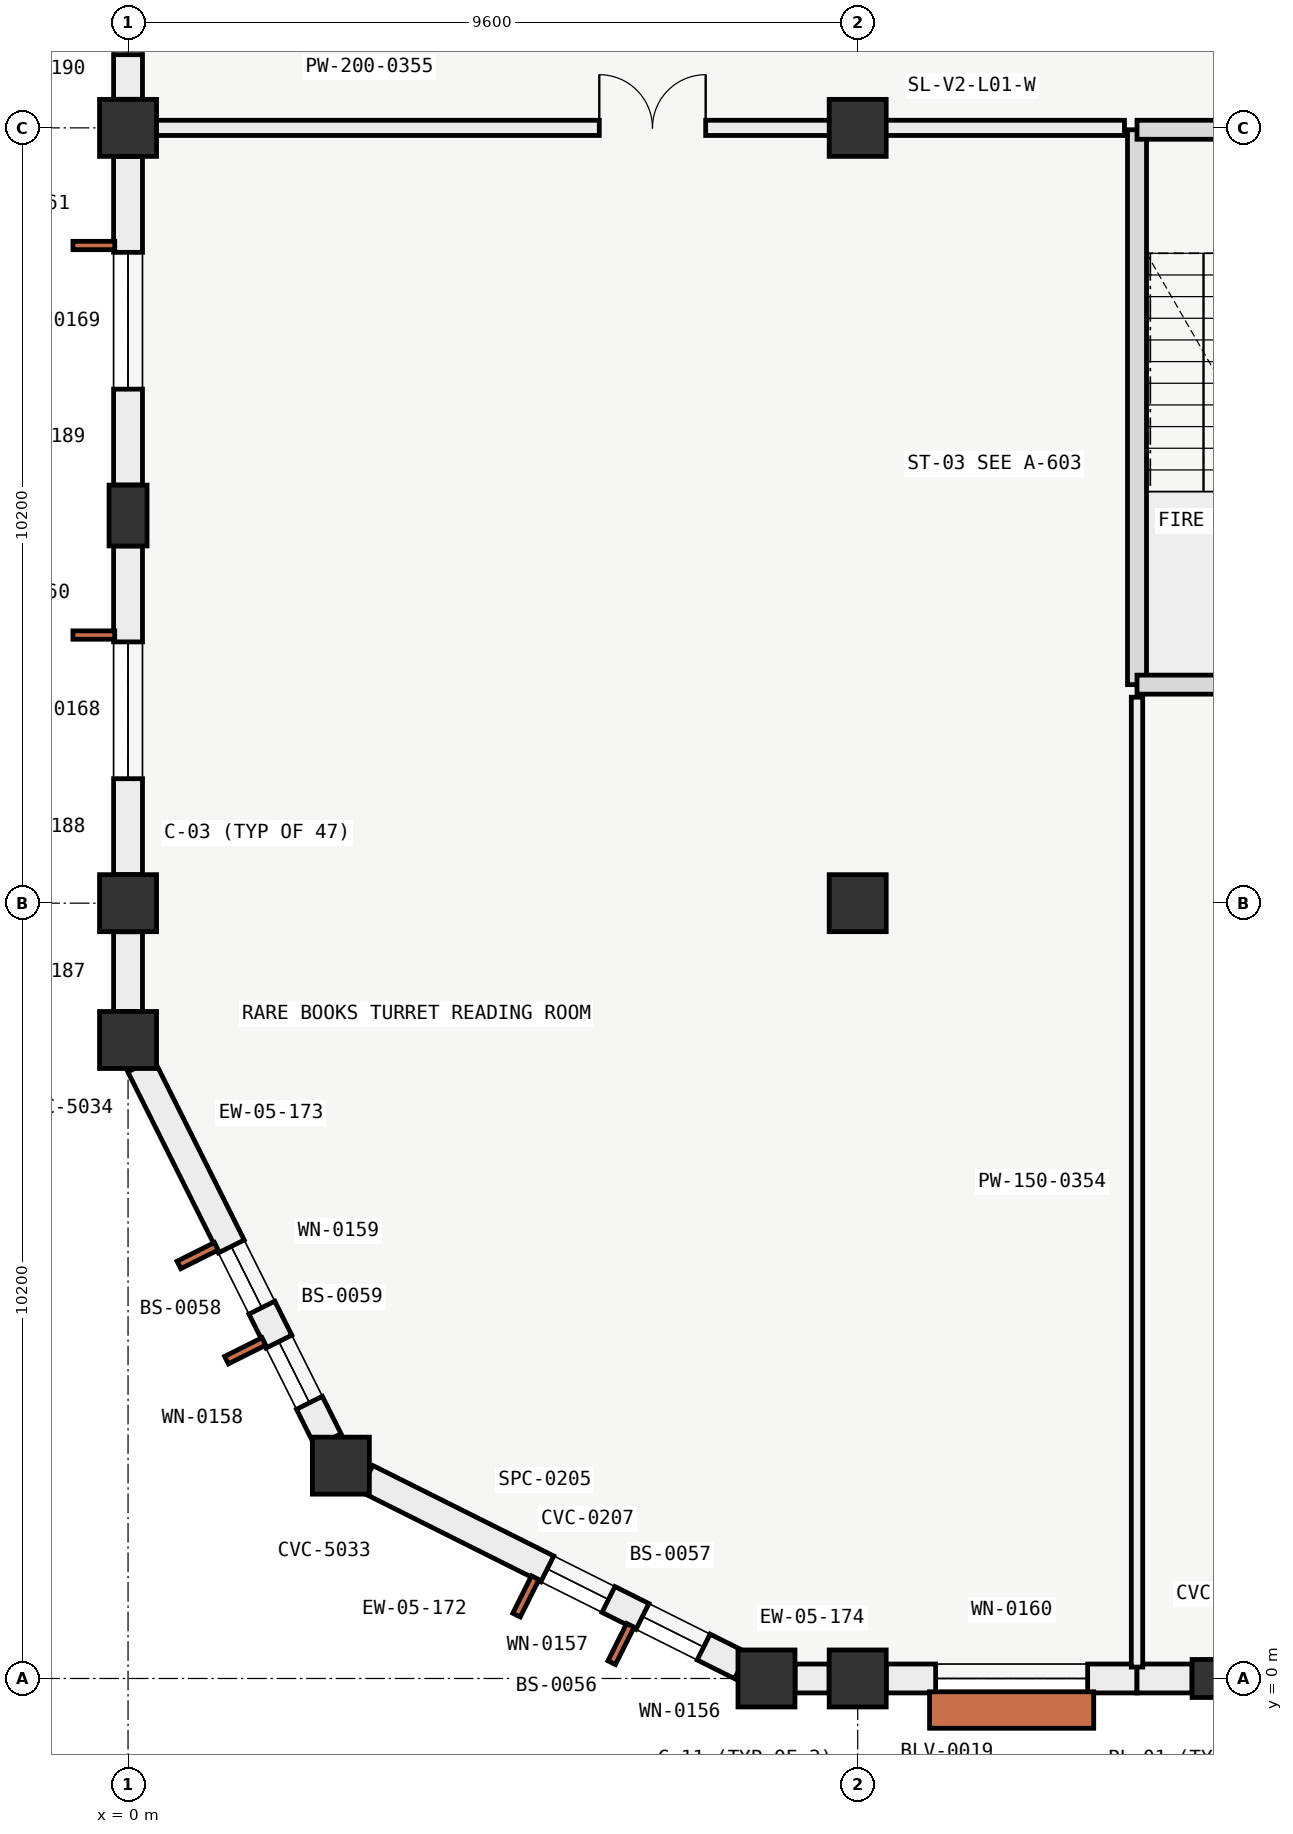
"""IFC4 building model, lengths in metres.
Left out: names, types, materials, properties, quantities, classifications, styles, units other than length and angle.
Written with IfcOpenShell. Run it as: python <this file> out.ifc"""

import sys

from ifc_helpers import new_model, si_unit, direction, frame, frame_2d, origin, origin_2d, place, context, subcontext, project, spatial, rectangle, circle, extrude, element, fill, save


model = new_model("IFC4")
c1 = context("Model", 3, precision=1e-05, world=origin(), true_north=direction((0.0, 1.0)))
c2 = subcontext(c1, "Body", "Model", "MODEL_VIEW")
j1 = project(units=[si_unit("LENGTHUNIT", "METRE"), si_unit("PLANEANGLEUNIT", "RADIAN")], contexts=[c1])
p1 = place(None, origin())
s1 = spatial("IfcSite", under=j1, at=p1, CompositionType="ELEMENT")
p2 = place(p1, origin())
s2 = spatial("IfcBuilding", under=s1, at=p2, CompositionType="ELEMENT")
p3 = place(p2, frame((0.0, 0.0, 5.4)))
s3 = spatial("IfcBuildingStorey", under=s2, at=p3, CompositionType="ELEMENT", Elevation=5.4)
for number, where, z_axis, x_axis in (
    (1, (0.0, 10.2, 0.0), (0.0, 0.0, 1.0), (1.0, 0.0, 0.0)),
    (2, (0.0, 20.4, 0.0), (0.0, 0.0, 1.0), (1.0, 0.0, 0.0)),
    (3, (9.6, 0.0, 0.0), (0.0, 0.0, 1.0), (1.0, 0.0, 0.0)),
    (4, (9.6, 10.2, 0.0), (0.0, 0.0, 1.0), (1.0, 0.0, 0.0)),
    (5, (9.6, 20.4, 0.0), (0.0, 0.0, 1.0), (1.0, 0.0, 0.0)),
):
    element("IfcColumn", number, at=place(p3, frame(where, z_axis=z_axis, x_axis=x_axis)), inside=s3, PredefinedType="COLUMN", context=c2, shape_type="SweptSolid", body=[
        extrude(rectangle(XDim=0.75, YDim=0.75, at=origin_2d()), origin(), (0.0, 0.0, 1.0), 4.2),
    ])
for number, where, z_axis, x_axis in (
    (6, (8.4, 0.0, 0.0), (0.0, 0.0, 1.0), (0.0, 1.0, 0.0)),
    (7, (2.8, 2.8, 0.0), (0.0, 0.0, 1.0), (0.707, 0.707, 0.0)),
    (8, (0.0, 8.4, 0.0), (0.0, 0.0, 1.0), (1.0, 0.0, 0.0)),
):
    element("IfcColumn", number, at=place(p3, frame(where, z_axis=z_axis, x_axis=x_axis)), inside=s3, PredefinedType="COLUMN", context=c2, shape_type="SweptSolid", body=[
        extrude(circle(Radius=0.375, at=origin_2d()), origin(), (0.0, 0.0, 1.0), 4.2),
    ])
for number, where, z_axis, x_axis in (
    (9, (14.4, 0.0, 0.0), (0.0, 0.0, 1.0), (0.0, 1.0, 0.0)),
    (10, (0.0, 15.3, 0.0), (0.0, 0.0, 1.0), (1.0, 0.0, 0.0)),
):
    element("IfcColumn", number, at=place(p3, frame(where, z_axis=z_axis, x_axis=x_axis)), inside=s3, PredefinedType="PILASTER", context=c2, shape_type="SweptSolid", body=[
        extrude(rectangle(XDim=0.5, YDim=0.8, at=origin_2d()), origin(), (0.0, 0.0, 1.0), 4.2),
    ])
p4 = place(p3, frame((8.065, 0.167, 0.0), z_axis=(0.0, 0.0, 1.0), x_axis=(-0.89443604882, 0.447195879422, 0.0)))
e11 = element("IfcWall", 11, at=p4, inside=s3, PredefinedType="SOLIDWALL", context=c2, shape_type="SweptSolid", body=[
    extrude(rectangle(XDim=5.512, YDim=0.38, at=frame_2d((2.756, 0.0))), origin(), (0.0, 0.0, 1.0), 3.2),
])
p5 = place(p4, frame((0.55, 0.0, 0.7)))
e12 = element("IfcOpeningElement", 12, at=p5, cuts=e11, PredefinedType="OPENING", context=c2, shape_type="SweptSolid", body=[
    extrude(rectangle(XDim=0.9, YDim=2.2, at=frame_2d((0.45, 1.1))), frame((0.0, 0.2, 0.0), z_axis=(0.0, -1.0, 0.0), x_axis=(1.0, 0.0, 0.0)), (0.0, 0.0, 1.0), 0.4),
])
p6 = place(p4, frame((1.95, 0.0, 0.7)))
e13 = element("IfcOpeningElement", 13, at=p6, cuts=e11, PredefinedType="OPENING", context=c2, shape_type="SweptSolid", body=[
    extrude(rectangle(XDim=0.9, YDim=2.2, at=frame_2d((0.45, 1.1))), frame((0.0, 0.2, 0.0), z_axis=(0.0, -1.0, 0.0), x_axis=(1.0, 0.0, 0.0)), (0.0, 0.0, 1.0), 0.4),
])
p7 = place(p3, frame((2.633, 3.135, 0.0), z_axis=(0.0, 0.0, 1.0), x_axis=(-0.447195879422, 0.89443604882, 0.0)))
e14 = element("IfcWall", 14, at=p7, inside=s3, PredefinedType="SOLIDWALL", context=c2, shape_type="SweptSolid", body=[
    extrude(rectangle(XDim=5.512, YDim=0.38, at=frame_2d((2.756, 0.0))), origin(), (0.0, 0.0, 1.0), 3.2),
])
p8 = place(p7, frame((0.55, 0.0, 0.7)))
e15 = element("IfcOpeningElement", 15, at=p8, cuts=e14, PredefinedType="OPENING", context=c2, shape_type="SweptSolid", body=[
    extrude(rectangle(XDim=0.9, YDim=2.2, at=frame_2d((0.45, 1.1))), frame((0.0, 0.2, 0.0), z_axis=(0.0, -1.0, 0.0), x_axis=(1.0, 0.0, 0.0)), (0.0, 0.0, 1.0), 0.4),
])
p9 = place(p7, frame((1.95, 0.0, 0.7)))
e16 = element("IfcOpeningElement", 16, at=p9, cuts=e14, PredefinedType="OPENING", context=c2, shape_type="SweptSolid", body=[
    extrude(rectangle(XDim=0.9, YDim=2.2, at=frame_2d((0.45, 1.1))), frame((0.0, 0.2, 0.0), z_axis=(0.0, -1.0, 0.0), x_axis=(1.0, 0.0, 0.0)), (0.0, 0.0, 1.0), 0.4),
])
p10 = place(p3, frame((9.224, 0.0, 0.0), z_axis=(0.0, 0.0, 1.0), x_axis=(-1.0, 0.0, 0.0)))
e17 = element("IfcWall", 17, at=p10, inside=s3, PredefinedType="SOLIDWALL", context=c2, shape_type="SweptSolid", body=[
    extrude(rectangle(XDim=0.448, YDim=0.38, at=frame_2d((0.224, 0.0))), origin(), (0.0, 0.0, 1.0), 3.25),
])
p11 = place(p3, frame((13.275, 0.0, 0.0), z_axis=(0.0, 0.0, 1.0), x_axis=(-1.0, 0.0, 0.0)))
e18 = element("IfcWall", 18, at=p11, inside=s3, PredefinedType="SOLIDWALL", context=c2, shape_type="SweptSolid", body=[
    extrude(rectangle(XDim=3.299, YDim=0.38, at=frame_2d((1.649, 0.0))), origin(), (0.0, 0.0, 1.0), 3.25),
])
p12 = place(p11, frame((0.649, 0.0, 0.8)))
e19 = element("IfcOpeningElement", 19, at=p12, cuts=e18, PredefinedType="OPENING", context=c2, shape_type="SweptSolid", body=[
    extrude(rectangle(XDim=2.0, YDim=1.35, at=frame_2d((1.0, 0.675))), frame((0.0, 0.2, 0.0), z_axis=(0.0, -1.0, 0.0), x_axis=(1.0, 0.0, 0.0)), (0.0, 0.0, 1.0), 0.4),
])
p13 = place(p3, frame((13.999, 0.0, 0.0), z_axis=(0.0, 0.0, 1.0), x_axis=(-1.0, 0.0, 0.0)))
e20 = element("IfcWall", 20, at=p13, inside=s3, PredefinedType="SOLIDWALL", context=c2, shape_type="SweptSolid", body=[
    extrude(rectangle(XDim=0.724, YDim=0.38, at=frame_2d((0.362, 0.0))), origin(), (0.0, 0.0, 1.0), 3.25),
])
p14 = place(p3, frame((0.0, 8.776, 0.0), z_axis=(0.0, 0.0, 1.0), x_axis=(0.0, 1.0, 0.0)))
e21 = element("IfcWall", 21, at=p14, inside=s3, PredefinedType="SOLIDWALL", context=c2, shape_type="SweptSolid", body=[
    extrude(rectangle(XDim=1.048, YDim=0.38, at=frame_2d((0.524, 0.0))), origin(), (0.0, 0.0, 1.0), 3.25),
])
p15 = place(p3, frame((0.0, 10.576, 0.0), z_axis=(0.0, 0.0, 1.0), x_axis=(0.0, 1.0, 0.0)))
e22 = element("IfcWall", 22, at=p15, inside=s3, PredefinedType="SOLIDWALL", context=c2, shape_type="SweptSolid", body=[
    extrude(rectangle(XDim=4.323, YDim=0.38, at=frame_2d((2.162, 0.0))), origin(), (0.0, 0.0, 1.0), 3.25),
])
p16 = place(p15, frame((1.261, 0.0, 0.85)))
e23 = element("IfcOpeningElement", 23, at=p16, cuts=e22, PredefinedType="OPENING", context=c2, shape_type="SweptSolid", body=[
    extrude(rectangle(XDim=1.8, YDim=2.1, at=frame_2d((0.9, 1.05))), frame((0.0, 0.2, 0.0), z_axis=(0.0, -1.0, 0.0), x_axis=(1.0, 0.0, 0.0)), (0.0, 0.0, 1.0), 0.4),
])
p17 = place(p3, frame((0.0, 15.701, 0.0), z_axis=(0.0, 0.0, 1.0), x_axis=(0.0, 1.0, 0.0)))
e24 = element("IfcWall", 24, at=p17, inside=s3, PredefinedType="SOLIDWALL", context=c2, shape_type="SweptSolid", body=[
    extrude(rectangle(XDim=4.323, YDim=0.38, at=frame_2d((2.162, 0.0))), origin(), (0.0, 0.0, 1.0), 3.25),
])
p18 = place(p17, frame((1.261, 0.0, 0.85)))
e25 = element("IfcOpeningElement", 25, at=p18, cuts=e24, PredefinedType="OPENING", context=c2, shape_type="SweptSolid", body=[
    extrude(rectangle(XDim=1.8, YDim=2.1, at=frame_2d((0.9, 1.05))), frame((0.0, 0.2, 0.0), z_axis=(0.0, -1.0, 0.0), x_axis=(1.0, 0.0, 0.0)), (0.0, 0.0, 1.0), 0.4),
])
p19 = place(p3, frame((0.0, 20.776, 0.0), z_axis=(0.0, 0.0, 1.0), x_axis=(0.0, 1.0, 0.0)))
e26 = element("IfcWall", 26, at=p19, inside=s3, PredefinedType="SOLIDWALL", context=c2, shape_type="SweptSolid", body=[
    extrude(rectangle(XDim=3.174, YDim=0.38, at=frame_2d((1.587, 0.0))), origin(), (0.0, 0.0, 1.0), 3.25),
])
p20 = place(p19, frame((0.587, 0.0, 0.75)))
e27 = element("IfcOpeningElement", 27, at=p20, cuts=e26, PredefinedType="OPENING", context=c2, shape_type="SweptSolid", body=[
    extrude(rectangle(XDim=2.0, YDim=1.35, at=frame_2d((1.0, 0.675))), frame((0.0, 0.2, 0.0), z_axis=(0.0, -1.0, 0.0), x_axis=(1.0, 0.0, 0.0)), (0.0, 0.0, 1.0), 0.4),
])
p21 = place(p3, frame((13.275, 20.375, 0.0), z_axis=(0.0, 0.0, 1.0), x_axis=(0.0, -1.0, 0.0)))
e28 = element("IfcWall", 28, at=p21, inside=s3, PredefinedType="SOLIDWALL", context=c2, shape_type="SweptSolid", body=[
    extrude(rectangle(XDim=7.3, YDim=0.25, at=frame_2d((3.65, 0.0))), origin(), (0.0, 0.0, 1.0), 3.92),
])
p22 = place(p3, frame((13.275, 13.075, 0.0), z_axis=(0.0, 0.0, 1.0), x_axis=(1.0, 0.0, 0.0)))
e29 = element("IfcWall", 29, at=p22, inside=s3, PredefinedType="SOLIDWALL", context=c2, shape_type="SweptSolid", body=[
    extrude(rectangle(XDim=3.45, YDim=0.25, at=frame_2d((1.725, 0.0))), origin(), (0.0, 0.0, 1.0), 3.92),
])
p23 = place(p3, frame((16.725, 20.375, 0.0), z_axis=(0.0, 0.0, 1.0), x_axis=(-1.0, 0.0, 0.0)))
e30 = element("IfcWall", 30, at=p23, inside=s3, PredefinedType="SOLIDWALL", context=c2, shape_type="SweptSolid", body=[
    extrude(rectangle(XDim=3.45, YDim=0.25, at=frame_2d((1.725, 0.0))), origin(), (0.0, 0.0, 1.0), 3.92),
])
p24 = place(p23, frame((1.175, 0.0, 0.0)))
e31 = element("IfcOpeningElement", 31, at=p24, cuts=e30, PredefinedType="OPENING", context=c2, shape_type="SweptSolid", body=[
    extrude(rectangle(XDim=1.1, YDim=2.2, at=frame_2d((0.55, 1.1))), frame((0.0, 0.135, 0.0), z_axis=(0.0, -1.0, 0.0), x_axis=(1.0, 0.0, 0.0)), (0.0, 0.0, 1.0), 0.27),
])
p25 = place(p3, frame((13.275, 0.15, 0.0), z_axis=(0.0, 0.0, 1.0), x_axis=(0.0, 1.0, 0.0)))
e32 = element("IfcWall", 32, at=p25, inside=s3, PredefinedType="PARTITIONING", context=c2, shape_type="SweptSolid", body=[
    extrude(rectangle(XDim=12.76, YDim=0.15, at=frame_2d((6.38, 0.0))), origin(), (0.0, 0.0, 1.0), 3.2),
])
p26 = place(p3, frame((0.15, 20.4, 0.0), z_axis=(0.0, 0.0, 1.0), x_axis=(1.0, 0.0, 0.0)))
e33 = element("IfcWall", 33, at=p26, inside=s3, PredefinedType="PARTITIONING", context=c2, shape_type="SweptSolid", body=[
    extrude(rectangle(XDim=12.96, YDim=0.2, at=frame_2d((6.48, 0.0))), origin(), (0.0, 0.0, 1.0), 3.2),
])
p27 = place(p26, frame((6.05, 0.0, 0.0)))
e34 = element("IfcOpeningElement", 34, at=p27, cuts=e33, PredefinedType="OPENING", context=c2, shape_type="SweptSolid", body=[
    extrude(rectangle(XDim=1.4, YDim=2.2, at=frame_2d((0.7, 1.1))), frame((0.0, 0.11, 0.0), z_axis=(0.0, -1.0, 0.0), x_axis=(1.0, 0.0, 0.0)), (0.0, 0.0, 1.0), 0.22),
])
p28 = place(p5, origin())
e35 = element("IfcWindow", 35, at=p28, inside=s3, PartitioningType="SINGLE_PANEL", PredefinedType="WINDOW", context=c2, shape_type="SweptSolid", body=[
    extrude(rectangle(XDim=0.9, YDim=2.2, at=frame_2d((0.45, 1.1))), frame((0.0, 0.03, 0.0), z_axis=(0.0, -1.0, 0.0), x_axis=(1.0, 0.0, 0.0)), (0.0, 0.0, 1.0), 0.06),
])
fill(e12, e35)
p29 = place(p6, origin())
e36 = element("IfcWindow", 36, at=p29, inside=s3, PartitioningType="SINGLE_PANEL", PredefinedType="WINDOW", context=c2, shape_type="SweptSolid", body=[
    extrude(rectangle(XDim=0.9, YDim=2.2, at=frame_2d((0.45, 1.1))), frame((0.0, 0.03, 0.0), z_axis=(0.0, -1.0, 0.0), x_axis=(1.0, 0.0, 0.0)), (0.0, 0.0, 1.0), 0.06),
])
fill(e13, e36)
p30 = place(p8, origin())
e37 = element("IfcWindow", 37, at=p30, inside=s3, PartitioningType="SINGLE_PANEL", PredefinedType="WINDOW", context=c2, shape_type="SweptSolid", body=[
    extrude(rectangle(XDim=0.9, YDim=2.2, at=frame_2d((0.45, 1.1))), frame((0.0, 0.03, 0.0), z_axis=(0.0, -1.0, 0.0), x_axis=(1.0, 0.0, 0.0)), (0.0, 0.0, 1.0), 0.06),
])
fill(e15, e37)
p31 = place(p9, origin())
e38 = element("IfcWindow", 38, at=p31, inside=s3, PartitioningType="SINGLE_PANEL", PredefinedType="WINDOW", context=c2, shape_type="SweptSolid", body=[
    extrude(rectangle(XDim=0.9, YDim=2.2, at=frame_2d((0.45, 1.1))), frame((0.0, 0.03, 0.0), z_axis=(0.0, -1.0, 0.0), x_axis=(1.0, 0.0, 0.0)), (0.0, 0.0, 1.0), 0.06),
])
fill(e16, e38)
p32 = place(p12, origin())
e39 = element("IfcWindow", 39, at=p32, inside=s3, PartitioningType="SINGLE_PANEL", PredefinedType="WINDOW", context=c2, shape_type="SweptSolid", body=[
    extrude(rectangle(XDim=2.0, YDim=1.35, at=frame_2d((1.0, 0.675))), frame((0.0, 0.03, 0.0), z_axis=(0.0, -1.0, 0.0), x_axis=(1.0, 0.0, 0.0)), (0.0, 0.0, 1.0), 0.06),
])
fill(e19, e39)
p33 = place(p16, origin())
e40 = element("IfcWindow", 40, at=p33, inside=s3, PartitioningType="SINGLE_PANEL", PredefinedType="WINDOW", context=c2, shape_type="SweptSolid", body=[
    extrude(rectangle(XDim=1.8, YDim=2.1, at=frame_2d((0.9, 1.05))), frame((0.0, 0.03, 0.0), z_axis=(0.0, -1.0, 0.0), x_axis=(1.0, 0.0, 0.0)), (0.0, 0.0, 1.0), 0.06),
])
fill(e23, e40)
p34 = place(p18, origin())
e41 = element("IfcWindow", 41, at=p34, inside=s3, PartitioningType="SINGLE_PANEL", PredefinedType="WINDOW", context=c2, shape_type="SweptSolid", body=[
    extrude(rectangle(XDim=1.8, YDim=2.1, at=frame_2d((0.9, 1.05))), frame((0.0, 0.03, 0.0), z_axis=(0.0, -1.0, 0.0), x_axis=(1.0, 0.0, 0.0)), (0.0, 0.0, 1.0), 0.06),
])
fill(e25, e41)
p35 = place(p20, origin())
e42 = element("IfcWindow", 42, at=p35, inside=s3, PartitioningType="SINGLE_PANEL", PredefinedType="WINDOW", context=c2, shape_type="SweptSolid", body=[
    extrude(rectangle(XDim=2.0, YDim=1.35, at=frame_2d((1.0, 0.675))), frame((0.0, 0.03, 0.0), z_axis=(0.0, -1.0, 0.0), x_axis=(1.0, 0.0, 0.0)), (0.0, 0.0, 1.0), 0.06),
])
fill(e27, e42)
p36 = place(p27, origin())
e43 = element("IfcDoor", 43, at=p36, inside=s3, OperationType="DOUBLE_DOOR_SINGLE_SWING", PredefinedType="DOOR", context=c2, shape_type="SweptSolid", body=[
    extrude(rectangle(XDim=1.4, YDim=2.2, at=frame_2d((0.7, 1.1))), frame((0.0, 0.025, 0.0), z_axis=(0.0, -1.0, 0.0), x_axis=(1.0, 0.0, 0.0)), (0.0, 0.0, 1.0), 0.05),
])
fill(e34, e43)
save(model, sys.argv[1])
